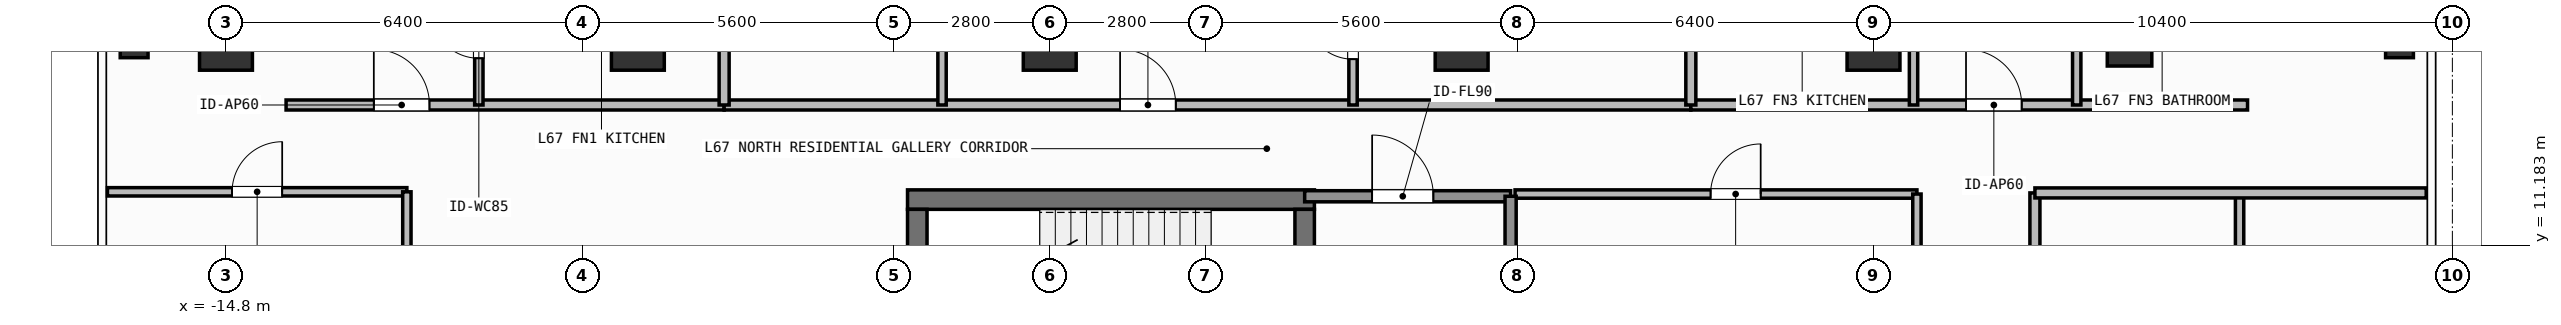
"""IFC4 building model, lengths in metres.
Left out: names, types, materials, properties, quantities, classifications, styles, units other than length and angle.
Written with IfcOpenShell. Run it as: python <this file> out.ifc"""

import sys

from ifc_helpers import new_model, si_unit, direction, frame, frame_2d, origin, origin_2d, place, context, subcontext, project, spatial, rectangle, hollow_rectangle, extrude, element, fill, save


model = new_model("IFC4")
c1 = context("Model", 3, precision=1e-05, world=origin(), true_north=direction((0.0, 1.0)))
c2 = subcontext(c1, "Body", "Model", "MODEL_VIEW")
j1 = project(units=[si_unit("LENGTHUNIT", "METRE"), si_unit("PLANEANGLEUNIT", "RADIAN")], contexts=[c1])
p1 = place(None, origin())
s1 = spatial("IfcSite", under=j1, at=p1, CompositionType="ELEMENT")
p2 = place(p1, origin())
s2 = spatial("IfcBuilding", under=s1, at=p2, CompositionType="ELEMENT")
p3 = place(p2, frame((0.0, 0.0, 274.2)))
s3 = spatial("IfcBuildingStorey", under=s2, at=p3, CompositionType="ELEMENT", Elevation=274.2)
p4 = place(p3, frame((-2.555, 12.0, 0.0), z_axis=(0.0, 0.0, 1.0), x_axis=(1.0, 0.0, 0.0)))
e1 = element("IfcWall", 1, at=p4, inside=s3, PredefinedType="SHEAR", context=c2, shape_type="SweptSolid", body=[
    extrude(rectangle(XDim=7.31, YDim=0.35, at=frame_2d((3.655, 0.0))), origin(), (0.0, 0.0, 1.0), 3.9),
])
p5 = place(p3, frame((-2.38, 8.9, 0.0), z_axis=(0.0, 0.0, 1.0), x_axis=(0.0, 1.0, 0.0)))
e2 = element("IfcWall", 2, at=p5, inside=s3, PredefinedType="SHEAR", context=c2, shape_type="SweptSolid", body=[
    extrude(rectangle(XDim=2.925, YDim=0.35, at=frame_2d((1.462, 0.0))), origin(), (0.0, 0.0, 1.0), 3.9),
])
p6 = place(p3, frame((4.58, 11.825, 0.0), z_axis=(0.0, 0.0, 1.0), x_axis=(0.0, -1.0, 0.0)))
e3 = element("IfcWall", 3, at=p6, inside=s3, PredefinedType="SHEAR", context=c2, shape_type="SweptSolid", body=[
    extrude(rectangle(XDim=2.925, YDim=0.35, at=frame_2d((1.462, 0.0))), origin(), (0.0, 0.0, 1.0), 3.9),
])
p7 = place(p6, frame((0.913, 0.0, 0.0)))
e4 = element("IfcOpeningElement", 4, at=p7, cuts=e3, PredefinedType="OPENING", context=c2, shape_type="SweptSolid", body=[
    extrude(rectangle(XDim=1.1, YDim=2.15, at=frame_2d((0.55, 1.075))), frame((0.0, 0.185, 0.0), z_axis=(0.0, -1.0, 0.0), x_axis=(1.0, 0.0, 0.0)), (0.0, 0.0, 1.0), 0.37),
])
for number, where, z_axis, x_axis in (
    (5, (-14.8, 14.8, 0.0), (0.0, 0.0, 1.0), (1.0, 0.0, 0.0)),
    (6, (-7.4, 14.8, 0.0), (0.0, 0.0, 1.0), (1.0, 0.0, 0.0)),
    (7, (0.0, 14.8, 0.0), (0.0, 0.0, 1.0), (1.0, 0.0, 0.0)),
    (8, (7.4, 14.8, 0.0), (0.0, 0.0, 1.0), (1.0, 0.0, 0.0)),
    (9, (14.8, 14.8, 0.0), (0.0, 0.0, 1.0), (1.0, 0.0, 0.0)),
):
    element("IfcColumn", number, at=place(p3, frame(where, z_axis=z_axis, x_axis=x_axis)), inside=s3, PredefinedType="COLUMN", context=c2, shape_type="SweptSolid", body=[
        extrude(rectangle(XDim=0.95, YDim=0.95, at=origin_2d()), origin(), (0.0, 0.0, 1.0), 3.9),
    ])
p8 = place(p3, frame((19.4, 14.8, 0.0), z_axis=(0.0, 0.0, 1.0), x_axis=(1.0, 0.0, 0.0)))
e10 = element("IfcColumn", 10, at=p8, inside=s3, PredefinedType="COLUMN", context=c2, shape_type="SweptSolid", body=[
    extrude(hollow_rectangle(XDim=0.8, YDim=0.8, WallThickness=0.036, at=origin_2d()), origin(), (0.0, 0.0, 1.0), 3.9),
])
for number, where, z_axis, x_axis in (
    (11, (-16.45, 14.8, 0.0), (0.0, 0.0, 1.0), (1.0, 0.0, 0.0)),
    (12, (24.25, 14.8, 0.0), (0.0, 0.0, 1.0), (1.0, 0.0, 0.0)),
):
    element("IfcColumn", number, at=place(p3, frame(where, z_axis=z_axis, x_axis=x_axis)), inside=s3, PredefinedType="COLUMN", context=c2, shape_type="SweptSolid", body=[
        extrude(hollow_rectangle(XDim=0.5, YDim=0.5, WallThickness=0.025, at=origin_2d()), origin(), (0.0, 0.0, 1.0), 3.9),
    ])
p9 = place(p3, frame((4.58, 12.06, 0.0), z_axis=(0.0, 0.0, 1.0), x_axis=(1.0, 0.0, 0.0)))
e13 = element("IfcWall", 13, at=p9, inside=s3, PredefinedType="SOLIDWALL", context=c2, shape_type="SweptSolid", body=[
    extrude(rectangle(XDim=3.7, YDim=0.2, at=frame_2d((1.85, 0.0))), origin(), (0.0, 0.0, 1.0), 3.68),
])
p10 = place(p9, frame((1.212, 0.0, 0.0)))
e14 = element("IfcOpeningElement", 14, at=p10, cuts=e13, PredefinedType="OPENING", context=c2, shape_type="SweptSolid", body=[
    extrude(rectangle(XDim=1.1, YDim=2.15, at=frame_2d((0.55, 1.075))), frame((0.0, 0.11, 0.0), z_axis=(0.0, -1.0, 0.0), x_axis=(1.0, 0.0, 0.0)), (0.0, 0.0, 1.0), 0.22),
])
p11 = place(p3, frame((8.36, 12.1, 0.0), z_axis=(0.0, 0.0, 1.0), x_axis=(1.0, 0.0, 0.0)))
e15 = element("IfcWall", 15, at=p11, inside=s3, PredefinedType="PARTITIONING", context=c2, shape_type="SweptSolid", body=[
    extrude(rectangle(XDim=7.22, YDim=0.15, at=frame_2d((3.61, 0.0))), origin(), (0.0, 0.0, 1.0), 3.68),
])
p12 = place(p11, frame((3.513, 0.0, 0.0)))
e16 = element("IfcOpeningElement", 16, at=p12, cuts=e15, PredefinedType="OPENING", context=c2, shape_type="SweptSolid", body=[
    extrude(rectangle(XDim=0.9, YDim=2.1, at=frame_2d((0.45, 1.05))), frame((0.0, 0.085, 0.0), z_axis=(0.0, -1.0, 0.0), x_axis=(1.0, 0.0, 0.0)), (0.0, 0.0, 1.0), 0.17),
])
p13 = place(p3, frame((-13.72, 13.7, 0.0), z_axis=(0.0, 0.0, 1.0), x_axis=(1.0, 0.0, 0.0)))
e17 = element("IfcWall", 17, at=p13, inside=s3, PredefinedType="PARTITIONING", context=c2, shape_type="SweptSolid", body=[
    extrude(rectangle(XDim=7.87, YDim=0.18, at=frame_2d((3.935, 0.0))), origin(), (0.0, 0.0, 1.0), 3.68),
])
p14 = place(p13, frame((1.576, 0.0, 0.0)))
e18 = element("IfcOpeningElement", 18, at=p14, cuts=e17, PredefinedType="OPENING", context=c2, shape_type="SweptSolid", body=[
    extrude(rectangle(XDim=1.0, YDim=2.2, at=frame_2d((0.5, 1.1))), frame((0.0, 0.1, 0.0), z_axis=(0.0, -1.0, 0.0), x_axis=(1.0, 0.0, 0.0)), (0.0, 0.0, 1.0), 0.2),
])
p15 = place(p3, frame((-10.257, 13.7, 0.0), z_axis=(0.0, 0.0, 1.0), x_axis=(0.0, 1.0, 0.0)))
e19 = element("IfcWall", 19, at=p15, inside=s3, PredefinedType="PARTITIONING", context=c2, shape_type="SweptSolid", body=[
    extrude(rectangle(XDim=2.359, YDim=0.15, at=frame_2d((1.18, 0.0))), origin(), (0.0, 0.0, 1.0), 3.68),
])
p16 = place(p15, frame((0.839, 0.0, 0.0)))
e20 = element("IfcOpeningElement", 20, at=p16, cuts=e19, PredefinedType="OPENING", context=c2, shape_type="SweptSolid", body=[
    extrude(rectangle(XDim=0.85, YDim=2.1, at=frame_2d((0.425, 1.05))), frame((0.0, 0.085, 0.0), z_axis=(0.0, -1.0, 0.0), x_axis=(1.0, 0.0, 0.0)), (0.0, 0.0, 1.0), 0.17),
])
p17 = place(p3, frame((-5.85, 13.7, 0.0), z_axis=(0.0, 0.0, 1.0), x_axis=(1.0, 0.0, 0.0)))
e21 = element("IfcWall", 21, at=p17, inside=s3, PredefinedType="PARTITIONING", context=c2, shape_type="SweptSolid", body=[
    extrude(rectangle(XDim=17.368, YDim=0.18, at=frame_2d((8.684, 0.0))), origin(), (0.0, 0.0, 1.0), 3.68),
])
p18 = place(p17, frame((7.114, 0.0, 0.0)))
e22 = element("IfcOpeningElement", 22, at=p18, cuts=e21, PredefinedType="OPENING", context=c2, shape_type="SweptSolid", body=[
    extrude(rectangle(XDim=1.0, YDim=2.2, at=frame_2d((0.5, 1.1))), frame((0.0, 0.1, 0.0), z_axis=(0.0, -1.0, 0.0), x_axis=(1.0, 0.0, 0.0)), (0.0, 0.0, 1.0), 0.2),
])
p19 = place(p3, frame((-1.935, 13.7, 0.0), z_axis=(0.0, 0.0, 1.0), x_axis=(0.0, 1.0, 0.0)))
e23 = element("IfcWall", 23, at=p19, inside=s3, PredefinedType="PARTITIONING", context=c2, shape_type="SweptSolid", body=[
    extrude(rectangle(XDim=4.044, YDim=0.15, at=frame_2d((2.022, 0.0))), origin(), (0.0, 0.0, 1.0), 3.68),
])
p20 = place(p19, frame((1.597, 0.0, 0.0)))
e24 = element("IfcOpeningElement", 24, at=p20, cuts=e23, PredefinedType="OPENING", context=c2, shape_type="SweptSolid", body=[
    extrude(rectangle(XDim=0.85, YDim=2.1, at=frame_2d((0.425, 1.05))), frame((0.0, 0.085, 0.0), z_axis=(0.0, -1.0, 0.0), x_axis=(1.0, 0.0, 0.0)), (0.0, 0.0, 1.0), 0.17),
])
p21 = place(p3, frame((5.449, 13.7, 0.0), z_axis=(0.0, 0.0, 1.0), x_axis=(0.0, 1.0, 0.0)))
e25 = element("IfcWall", 25, at=p21, inside=s3, PredefinedType="PARTITIONING", context=c2, shape_type="SweptSolid", body=[
    extrude(rectangle(XDim=2.661, YDim=0.15, at=frame_2d((1.331, 0.0))), origin(), (0.0, 0.0, 1.0), 3.68),
])
p22 = place(p21, frame((0.823, 0.0, 0.0)))
e26 = element("IfcOpeningElement", 26, at=p22, cuts=e25, PredefinedType="OPENING", context=c2, shape_type="SweptSolid", body=[
    extrude(rectangle(XDim=0.85, YDim=2.1, at=frame_2d((0.425, 1.05))), frame((0.0, 0.085, 0.0), z_axis=(0.0, -1.0, 0.0), x_axis=(1.0, 0.0, 0.0)), (0.0, 0.0, 1.0), 0.17),
])
p23 = place(p3, frame((11.518, 13.7, 0.0), z_axis=(0.0, 0.0, 1.0), x_axis=(1.0, 0.0, 0.0)))
e27 = element("IfcWall", 27, at=p23, inside=s3, PredefinedType="PARTITIONING", context=c2, shape_type="SweptSolid", body=[
    extrude(rectangle(XDim=10.002, YDim=0.18, at=frame_2d((5.001, 0.0))), origin(), (0.0, 0.0, 1.0), 3.68),
])
p24 = place(p23, frame((4.944, 0.0, 0.0)))
e28 = element("IfcOpeningElement", 28, at=p24, cuts=e27, PredefinedType="OPENING", context=c2, shape_type="SweptSolid", body=[
    extrude(rectangle(XDim=1.0, YDim=2.2, at=frame_2d((0.5, 1.1))), frame((0.0, 0.1, 0.0), z_axis=(0.0, -1.0, 0.0), x_axis=(1.0, 0.0, 0.0)), (0.0, 0.0, 1.0), 0.2),
])
p25 = place(p3, frame((15.519, 13.7, 0.0), z_axis=(0.0, 0.0, 1.0), x_axis=(0.0, 1.0, 0.0)))
e29 = element("IfcWall", 29, at=p25, inside=s3, PredefinedType="PARTITIONING", context=c2, shape_type="SweptSolid", body=[
    extrude(rectangle(XDim=3.721, YDim=0.15, at=frame_2d((1.86, 0.0))), origin(), (0.0, 0.0, 1.0), 3.68),
])
p26 = place(p25, frame((1.691, 0.0, 0.0)))
e30 = element("IfcOpeningElement", 30, at=p26, cuts=e29, PredefinedType="OPENING", context=c2, shape_type="SweptSolid", body=[
    extrude(rectangle(XDim=0.85, YDim=2.1, at=frame_2d((0.425, 1.05))), frame((0.0, 0.085, 0.0), z_axis=(0.0, -1.0, 0.0), x_axis=(1.0, 0.0, 0.0)), (0.0, 0.0, 1.0), 0.17),
])
p27 = place(p3, frame((18.451, 13.7, 0.0), z_axis=(0.0, 0.0, 1.0), x_axis=(0.0, 1.0, 0.0)))
e31 = element("IfcWall", 31, at=p27, inside=s3, PredefinedType="PARTITIONING", context=c2, shape_type="SweptSolid", body=[
    extrude(rectangle(XDim=3.721, YDim=0.15, at=frame_2d((1.86, 0.0))), origin(), (0.0, 0.0, 1.0), 3.68),
])
p28 = place(p27, frame((1.691, 0.0, 0.0)))
e32 = element("IfcOpeningElement", 32, at=p28, cuts=e31, PredefinedType="OPENING", context=c2, shape_type="SweptSolid", body=[
    extrude(rectangle(XDim=0.85, YDim=2.1, at=frame_2d((0.425, 1.05))), frame((0.0, 0.085, 0.0), z_axis=(0.0, -1.0, 0.0), x_axis=(1.0, 0.0, 0.0)), (0.0, 0.0, 1.0), 0.17),
])
p29 = place(p3, frame((-16.93, 12.14, 0.0), z_axis=(0.0, 0.0, 1.0), x_axis=(1.0, 0.0, 0.0)))
e33 = element("IfcWall", 33, at=p29, inside=s3, PredefinedType="PARTITIONING", context=c2, shape_type="SweptSolid", body=[
    extrude(rectangle(XDim=5.38, YDim=0.15, at=frame_2d((2.69, 0.0))), origin(), (0.0, 0.0, 1.0), 3.68),
])
p30 = place(p29, frame((2.24, 0.0, 0.0)))
e34 = element("IfcOpeningElement", 34, at=p30, cuts=e33, PredefinedType="OPENING", context=c2, shape_type="SweptSolid", body=[
    extrude(rectangle(XDim=0.9, YDim=2.1, at=frame_2d((0.45, 1.05))), frame((0.0, 0.085, 0.0), z_axis=(0.0, -1.0, 0.0), x_axis=(1.0, 0.0, 0.0)), (0.0, 0.0, 1.0), 0.17),
])
p31 = place(p3, frame((17.7, -12.12, 0.0), z_axis=(0.0, 0.0, 1.0), x_axis=(0.0, 1.0, 0.0)))
e35 = element("IfcWall", 35, at=p31, inside=s3, PredefinedType="PARTITIONING", context=c2, shape_type="SweptSolid", body=[
    extrude(rectangle(XDim=24.24, YDim=0.18, at=frame_2d((12.12, 0.0))), origin(), (0.0, 0.0, 1.0), 3.68),
])
p32 = place(p31, frame((11.62, 0.0, 0.0)))
e36 = element("IfcOpeningElement", 36, at=p32, cuts=e35, PredefinedType="OPENING", context=c2, shape_type="SweptSolid", body=[
    extrude(rectangle(XDim=1.0, YDim=2.2, at=frame_2d((0.5, 1.1))), frame((0.0, 0.1, 0.0), z_axis=(0.0, -1.0, 0.0), x_axis=(1.0, 0.0, 0.0)), (0.0, 0.0, 1.0), 0.2),
])
p33 = place(p3, frame((8.28, 8.725, 0.0), z_axis=(0.0, 0.0, 1.0), x_axis=(0.0, 1.0, 0.0)))
e37 = element("IfcWall", 37, at=p33, inside=s3, PredefinedType="SOLIDWALL", context=c2, shape_type="SweptSolid", body=[
    extrude(rectangle(XDim=3.335, YDim=0.2, at=frame_2d((1.667, 0.0))), origin(), (0.0, 0.0, 1.0), 3.68),
])
p34 = place(p3, frame((15.58, 5.85, 0.0), z_axis=(0.0, 0.0, 1.0), x_axis=(0.0, 1.0, 0.0)))
e38 = element("IfcWall", 38, at=p34, inside=s3, PredefinedType="PARTITIONING", context=c2, shape_type="SweptSolid", body=[
    extrude(rectangle(XDim=6.25, YDim=0.15, at=frame_2d((3.125, 0.0))), origin(), (0.0, 0.0, 1.0), 3.68),
])
for number, where, z_axis, x_axis in (
    (39, (-5.85, 13.7, 0.0), (0.0, 0.0, 1.0), (0.0, 1.0, 0.0)),
    (40, (11.518, 13.7, 0.0), (0.0, 0.0, 1.0), (0.0, 1.0, 0.0)),
):
    element("IfcWall", number, at=place(p3, frame(where, z_axis=z_axis, x_axis=x_axis)), inside=s3, PredefinedType="PARTITIONING", context=c2, shape_type="SweptSolid", body=[
        extrude(rectangle(XDim=7.33, YDim=0.18, at=frame_2d((3.665, 0.0))), origin(), (0.0, 0.0, 1.0), 3.68),
    ])
p35 = place(p3, frame((-11.55, 4.1, 0.0), z_axis=(0.0, 0.0, 1.0), x_axis=(0.0, 1.0, 0.0)))
e41 = element("IfcWall", 41, at=p35, inside=s3, PredefinedType="PARTITIONING", context=c2, shape_type="SweptSolid", body=[
    extrude(rectangle(XDim=8.04, YDim=0.15, at=frame_2d((4.02, 0.0))), origin(), (0.0, 0.0, 1.0), 3.68),
])
p36 = place(p3, frame((21.377, 5.428, 0.0), z_axis=(0.0, 0.0, 1.0), x_axis=(0.0, 1.0, 0.0)))
e42 = element("IfcWall", 42, at=p36, inside=s3, PredefinedType="PARTITIONING", context=c2, shape_type="SweptSolid", body=[
    extrude(rectangle(XDim=6.692, YDim=0.15, at=frame_2d((3.346, 0.0))), origin(), (0.0, 0.0, 1.0), 3.68),
])
p37 = place(p3, frame((17.7, 12.12, 0.0), z_axis=(0.0, 0.0, 1.0), x_axis=(1.0, 0.0, 0.0)))
e43 = element("IfcWall", 43, at=p37, inside=s3, PredefinedType="PARTITIONING", context=c2, shape_type="SweptSolid", body=[
    extrude(rectangle(XDim=7.03, YDim=0.18, at=frame_2d((3.515, 0.0))), origin(), (0.0, 0.0, 1.0), 3.68),
])
p38 = place(p10, origin())
e44 = element("IfcDoor", 44, at=p38, inside=s3, OperationType="SINGLE_SWING_LEFT", PredefinedType="DOOR", context=c2, shape_type="SweptSolid", body=[
    extrude(rectangle(XDim=1.1, YDim=2.15, at=frame_2d((0.55, 1.075))), frame((0.0, 0.025, 0.0), z_axis=(0.0, -1.0, 0.0), x_axis=(1.0, 0.0, 0.0)), (0.0, 0.0, 1.0), 0.05),
])
fill(e14, e44)
p39 = place(p12, origin())
e45 = element("IfcDoor", 45, at=p39, inside=s3, OperationType="SINGLE_SWING_RIGHT", PredefinedType="DOOR", context=c2, shape_type="SweptSolid", body=[
    extrude(rectangle(XDim=0.9, YDim=2.1, at=frame_2d((0.45, 1.05))), frame((0.0, 0.025, 0.0), z_axis=(0.0, -1.0, 0.0), x_axis=(1.0, 0.0, 0.0)), (0.0, 0.0, 1.0), 0.05),
])
fill(e16, e45)
p40 = place(p14, origin())
e46 = element("IfcDoor", 46, at=p40, inside=s3, OperationType="SINGLE_SWING_LEFT", PredefinedType="DOOR", context=c2, shape_type="SweptSolid", body=[
    extrude(rectangle(XDim=1.0, YDim=2.2, at=frame_2d((0.5, 1.1))), frame((0.0, 0.025, 0.0), z_axis=(0.0, -1.0, 0.0), x_axis=(1.0, 0.0, 0.0)), (0.0, 0.0, 1.0), 0.05),
])
fill(e18, e46)
p41 = place(p16, origin())
e47 = element("IfcDoor", 47, at=p41, inside=s3, OperationType="SINGLE_SWING_RIGHT", PredefinedType="DOOR", context=c2, shape_type="SweptSolid", body=[
    extrude(rectangle(XDim=0.85, YDim=2.1, at=frame_2d((0.425, 1.05))), frame((0.0, 0.025, 0.0), z_axis=(0.0, -1.0, 0.0), x_axis=(1.0, 0.0, 0.0)), (0.0, 0.0, 1.0), 0.05),
])
fill(e20, e47)
p42 = place(p18, origin())
e48 = element("IfcDoor", 48, at=p42, inside=s3, OperationType="SINGLE_SWING_LEFT", PredefinedType="DOOR", context=c2, shape_type="SweptSolid", body=[
    extrude(rectangle(XDim=1.0, YDim=2.2, at=frame_2d((0.5, 1.1))), frame((0.0, 0.025, 0.0), z_axis=(0.0, -1.0, 0.0), x_axis=(1.0, 0.0, 0.0)), (0.0, 0.0, 1.0), 0.05),
])
fill(e22, e48)
p43 = place(p22, origin())
e49 = element("IfcDoor", 49, at=p43, inside=s3, OperationType="SINGLE_SWING_RIGHT", PredefinedType="DOOR", context=c2, shape_type="SweptSolid", body=[
    extrude(rectangle(XDim=0.85, YDim=2.1, at=frame_2d((0.425, 1.05))), frame((0.0, 0.025, 0.0), z_axis=(0.0, -1.0, 0.0), x_axis=(1.0, 0.0, 0.0)), (0.0, 0.0, 1.0), 0.05),
])
fill(e26, e49)
p44 = place(p24, origin())
e50 = element("IfcDoor", 50, at=p44, inside=s3, OperationType="SINGLE_SWING_LEFT", PredefinedType="DOOR", context=c2, shape_type="SweptSolid", body=[
    extrude(rectangle(XDim=1.0, YDim=2.2, at=frame_2d((0.5, 1.1))), frame((0.0, 0.025, 0.0), z_axis=(0.0, -1.0, 0.0), x_axis=(1.0, 0.0, 0.0)), (0.0, 0.0, 1.0), 0.05),
])
fill(e28, e50)
p45 = place(p30, origin())
e51 = element("IfcDoor", 51, at=p45, inside=s3, OperationType="SINGLE_SWING_RIGHT", PredefinedType="DOOR", context=c2, shape_type="SweptSolid", body=[
    extrude(rectangle(XDim=0.9, YDim=2.1, at=frame_2d((0.45, 1.05))), frame((0.0, 0.025, 0.0), z_axis=(0.0, -1.0, 0.0), x_axis=(1.0, 0.0, 0.0)), (0.0, 0.0, 1.0), 0.05),
])
fill(e34, e51)
save(model, sys.argv[1])
